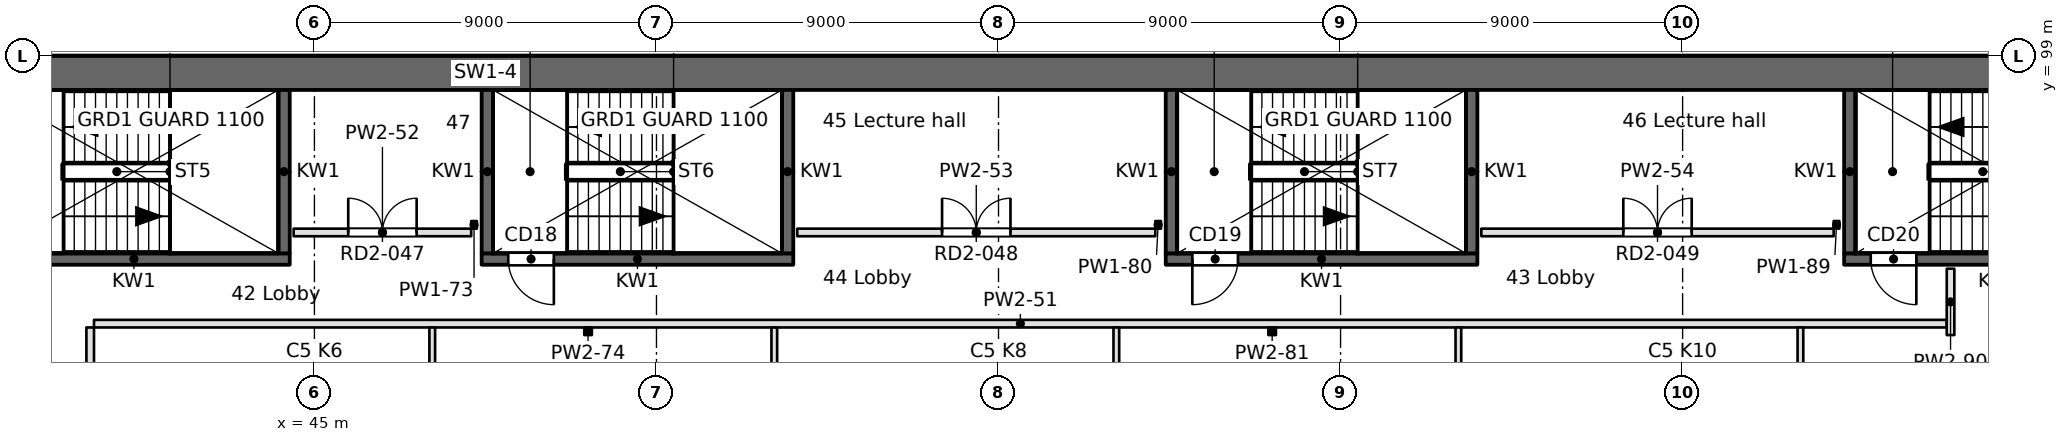
"""IFC4 building model, lengths in metres.
Left out: names, types, materials, properties, quantities, classifications, styles, units other than length and angle.
Written with IfcOpenShell. Run it as: python <this file> out.ifc"""

import sys

from ifc_helpers import new_model, si_unit, direction, frame, frame_2d, origin, place, context, subcontext, project, spatial, rectangle, extrude, element, fill, save


model = new_model("IFC4")
c1 = context("Model", 3, precision=1e-05, world=origin(), true_north=direction((0.0, 1.0)))
c2 = subcontext(c1, "Body", "Model", "MODEL_VIEW")
j1 = project(units=[si_unit("LENGTHUNIT", "METRE"), si_unit("PLANEANGLEUNIT", "RADIAN")], contexts=[c1])
p1 = place(None, origin())
s1 = spatial("IfcSite", under=j1, at=p1, CompositionType="ELEMENT")
p2 = place(p1, origin())
s2 = spatial("IfcBuilding", under=s1, at=p2, CompositionType="ELEMENT")
p3 = place(p2, frame((0.0, 0.0, 46.9)))
s3 = spatial("IfcBuildingStorey", under=s2, at=p3, CompositionType="ELEMENT", Elevation=46.9)
p4 = place(p3, frame((94.5, 98.55, 0.0), z_axis=(0.0, 0.0, 1.0), x_axis=(-1.0, 0.0, 0.0)))
e1 = element("IfcWall", 1, at=p4, inside=s3, PredefinedType="SHEAR", context=c2, shape_type="SweptSolid", body=[
    extrude(rectangle(XDim=90.0, YDim=0.9, at=frame_2d((45.0, 0.0))), origin(), (0.0, 0.0, 1.0), 3.7),
])
p5 = place(p3, frame((36.15, 93.65, -0.4), z_axis=(0.0, 0.0, 1.0), x_axis=(1.0, 0.0, 0.0)))
e2 = element("IfcWall", 2, at=p5, inside=s3, PredefinedType="SOLIDWALL", context=c2, shape_type="SweptSolid", body=[
    extrude(rectangle(XDim=8.2, YDim=0.3, at=frame_2d((4.1, 0.0))), origin(), (0.0, 0.0, 1.0), 3.7),
])
p6 = place(p5, frame((0.7, 0.0, 0.4)))
e3 = element("IfcOpeningElement", 3, at=p6, cuts=e2, PredefinedType="OPENING", context=c2, shape_type="SweptSolid", body=[
    extrude(rectangle(XDim=1.2, YDim=2.1, at=frame_2d((0.6, 1.05))), frame((0.0, 0.15, 0.0), z_axis=(0.0, -1.0, 0.0), x_axis=(1.0, 0.0, 0.0)), (0.0, 0.0, 1.0), 0.3),
])
p7 = place(p3, frame((49.4, 93.65, -0.4), z_axis=(0.0, 0.0, 1.0), x_axis=(1.0, 0.0, 0.0)))
e4 = element("IfcWall", 4, at=p7, inside=s3, PredefinedType="SOLIDWALL", context=c2, shape_type="SweptSolid", body=[
    extrude(rectangle(XDim=8.2, YDim=0.3, at=frame_2d((4.1, 0.0))), origin(), (0.0, 0.0, 1.0), 3.7),
])
p8 = place(p7, frame((0.7, 0.0, 0.4)))
e5 = element("IfcOpeningElement", 5, at=p8, cuts=e4, PredefinedType="OPENING", context=c2, shape_type="SweptSolid", body=[
    extrude(rectangle(XDim=1.2, YDim=2.1, at=frame_2d((0.6, 1.05))), frame((0.0, 0.15, 0.0), z_axis=(0.0, -1.0, 0.0), x_axis=(1.0, 0.0, 0.0)), (0.0, 0.0, 1.0), 0.3),
])
p9 = place(p3, frame((67.4, 93.65, -0.4), z_axis=(0.0, 0.0, 1.0), x_axis=(1.0, 0.0, 0.0)))
e6 = element("IfcWall", 6, at=p9, inside=s3, PredefinedType="SOLIDWALL", context=c2, shape_type="SweptSolid", body=[
    extrude(rectangle(XDim=8.2, YDim=0.3, at=frame_2d((4.1, 0.0))), origin(), (0.0, 0.0, 1.0), 3.7),
])
p10 = place(p9, frame((0.7, 0.0, 0.4)))
e7 = element("IfcOpeningElement", 7, at=p10, cuts=e6, PredefinedType="OPENING", context=c2, shape_type="SweptSolid", body=[
    extrude(rectangle(XDim=1.2, YDim=2.1, at=frame_2d((0.6, 1.05))), frame((0.0, 0.15, 0.0), z_axis=(0.0, -1.0, 0.0), x_axis=(1.0, 0.0, 0.0)), (0.0, 0.0, 1.0), 0.3),
])
p11 = place(p3, frame((85.25, 93.65, -0.4), z_axis=(0.0, 0.0, 1.0), x_axis=(1.0, 0.0, 0.0)))
e8 = element("IfcWall", 8, at=p11, inside=s3, PredefinedType="SOLIDWALL", context=c2, shape_type="SweptSolid", body=[
    extrude(rectangle(XDim=8.2, YDim=0.3, at=frame_2d((4.1, 0.0))), origin(), (0.0, 0.0, 1.0), 3.7),
])
p12 = place(p11, frame((0.7, 0.0, 0.4)))
e9 = element("IfcOpeningElement", 9, at=p12, cuts=e8, PredefinedType="OPENING", context=c2, shape_type="SweptSolid", body=[
    extrude(rectangle(XDim=1.2, YDim=2.1, at=frame_2d((0.6, 1.05))), frame((0.0, 0.15, 0.0), z_axis=(0.0, -1.0, 0.0), x_axis=(1.0, 0.0, 0.0)), (0.0, 0.0, 1.0), 0.3),
])
for number, where, z_axis, x_axis in (
    (10, (44.2, 93.8, -0.4), (0.0, 0.0, 1.0), (0.0, 1.0, 0.0)),
    (11, (49.55, 93.8, -0.4), (0.0, 0.0, 1.0), (0.0, 1.0, 0.0)),
    (12, (57.45, 93.8, -0.4), (0.0, 0.0, 1.0), (0.0, 1.0, 0.0)),
    (13, (67.55, 93.8, -0.4), (0.0, 0.0, 1.0), (0.0, 1.0, 0.0)),
    (14, (75.45, 93.8, -0.4), (0.0, 0.0, 1.0), (0.0, 1.0, 0.0)),
    (15, (85.4, 93.8, -0.4), (0.0, 0.0, 1.0), (0.0, 1.0, 0.0)),
):
    element("IfcWall", number, at=place(p3, frame(where, z_axis=z_axis, x_axis=x_axis)), inside=s3, PredefinedType="SOLIDWALL", context=c2, shape_type="SweptSolid", body=[
        extrude(rectangle(XDim=4.3, YDim=0.3, at=frame_2d((2.15, 0.0))), origin(), (0.0, 0.0, 1.0), 3.7),
    ])
p13 = place(p3, frame((87.95, 91.95, 0.0), z_axis=(0.0, 0.0, 1.0), x_axis=(-1.0, 0.0, 0.0)))
e16 = element("IfcWall", 16, at=p13, inside=s3, PredefinedType="PARTITIONING", context=c2, shape_type="SweptSolid", body=[
    extrude(rectangle(XDim=48.75, YDim=0.2, at=frame_2d((24.375, 0.0))), origin(), (0.0, 0.0, 1.0), 3.3),
])
p14 = place(p3, frame((44.454, 94.35, 0.0), z_axis=(0.0, 0.0, 1.0), x_axis=(1.0, 0.0, 0.0)))
e17 = element("IfcWall", 17, at=p14, inside=s3, PredefinedType="PARTITIONING", context=c2, shape_type="SweptSolid", body=[
    extrude(rectangle(XDim=4.671, YDim=0.2, at=frame_2d((2.335, 0.0))), origin(), (0.0, 0.0, 1.0), 3.3),
])
p15 = place(p14, frame((1.436, 0.0, 0.0)))
e18 = element("IfcOpeningElement", 18, at=p15, cuts=e17, PredefinedType="OPENING", context=c2, shape_type="SweptSolid", body=[
    extrude(rectangle(XDim=1.8, YDim=2.1, at=frame_2d((0.9, 1.05))), frame((0.0, 0.1, 0.0), z_axis=(0.0, -1.0, 0.0), x_axis=(1.0, 0.0, 0.0)), (0.0, 0.0, 1.0), 0.2),
])
p16 = place(p3, frame((57.704, 94.35, 0.0), z_axis=(0.0, 0.0, 1.0), x_axis=(1.0, 0.0, 0.0)))
e19 = element("IfcWall", 19, at=p16, inside=s3, PredefinedType="PARTITIONING", context=c2, shape_type="SweptSolid", body=[
    extrude(rectangle(XDim=9.421, YDim=0.2, at=frame_2d((4.71, 0.0))), origin(), (0.0, 0.0, 1.0), 3.3),
])
p17 = place(p16, frame((3.811, 0.0, 0.0)))
e20 = element("IfcOpeningElement", 20, at=p17, cuts=e19, PredefinedType="OPENING", context=c2, shape_type="SweptSolid", body=[
    extrude(rectangle(XDim=1.8, YDim=2.1, at=frame_2d((0.9, 1.05))), frame((0.0, 0.1, 0.0), z_axis=(0.0, -1.0, 0.0), x_axis=(1.0, 0.0, 0.0)), (0.0, 0.0, 1.0), 0.2),
])
p18 = place(p3, frame((75.704, 94.35, 0.0), z_axis=(0.0, 0.0, 1.0), x_axis=(1.0, 0.0, 0.0)))
e21 = element("IfcWall", 21, at=p18, inside=s3, PredefinedType="PARTITIONING", context=c2, shape_type="SweptSolid", body=[
    extrude(rectangle(XDim=9.271, YDim=0.2, at=frame_2d((4.635, 0.0))), origin(), (0.0, 0.0, 1.0), 3.3),
])
p19 = place(p18, frame((3.736, 0.0, 0.0)))
e22 = element("IfcOpeningElement", 22, at=p19, cuts=e21, PredefinedType="OPENING", context=c2, shape_type="SweptSolid", body=[
    extrude(rectangle(XDim=1.8, YDim=2.1, at=frame_2d((0.9, 1.05))), frame((0.0, 0.1, 0.0), z_axis=(0.0, -1.0, 0.0), x_axis=(1.0, 0.0, 0.0)), (0.0, 0.0, 1.0), 0.2),
])
p20 = place(p3, frame((39.1, 91.85, 0.0), z_axis=(0.0, 0.0, 1.0), x_axis=(0.0, -1.0, 0.0)))
e23 = element("IfcWall", 23, at=p20, inside=s3, PredefinedType="PARTITIONING", context=c2, shape_type="SweptSolid", body=[
    extrude(rectangle(XDim=15.75, YDim=0.2, at=frame_2d((7.875, 0.0))), origin(), (0.0, 0.0, 1.0), 3.3),
])
p21 = place(p20, frame((7.375, 0.0, 0.0)))
e24 = element("IfcOpeningElement", 24, at=p21, cuts=e23, PredefinedType="OPENING", context=c2, shape_type="SweptSolid", body=[
    extrude(rectangle(XDim=1.0, YDim=2.1, at=frame_2d((0.5, 1.05))), frame((0.0, 0.1, 0.0), z_axis=(0.0, -1.0, 0.0), x_axis=(1.0, 0.0, 0.0)), (0.0, 0.0, 1.0), 0.2),
])
p22 = place(p20, frame((4.875, 0.0, 0.0)))
e25 = element("IfcOpeningElement", 25, at=p22, cuts=e23, PredefinedType="OPENING", context=c2, shape_type="SweptSolid", body=[
    extrude(rectangle(XDim=1.0, YDim=2.1, at=frame_2d((0.5, 1.05))), frame((0.0, 0.1, 0.0), z_axis=(0.0, -1.0, 0.0), x_axis=(1.0, 0.0, 0.0)), (0.0, 0.0, 1.0), 0.2),
])
p23 = place(p3, frame((48.1, 91.85, 0.0), z_axis=(0.0, 0.0, 1.0), x_axis=(0.0, -1.0, 0.0)))
e26 = element("IfcWall", 26, at=p23, inside=s3, PredefinedType="PARTITIONING", context=c2, shape_type="SweptSolid", body=[
    extrude(rectangle(XDim=15.75, YDim=0.15, at=frame_2d((7.875, 0.0))), origin(), (0.0, 0.0, 1.0), 3.3),
])
p24 = place(p3, frame((49.2, 94.65, 0.0), z_axis=(0.0, 0.0, 1.0), x_axis=(0.0, -1.0, 0.0)))
e27 = element("IfcWall", 27, at=p24, inside=s3, PredefinedType="PARTITIONING", context=c2, shape_type="SweptSolid", body=[
    extrude(rectangle(XDim=0.2, YDim=0.15, at=frame_2d((0.1, 0.0))), origin(), (0.0, 0.0, 1.0), 3.3),
])
p25 = place(p3, frame((52.2, 91.85, 0.0), z_axis=(0.0, 0.0, 1.0), x_axis=(0.0, -1.0, 0.0)))
e28 = element("IfcWall", 28, at=p25, inside=s3, PredefinedType="PARTITIONING", context=c2, shape_type="SweptSolid", body=[
    extrude(rectangle(XDim=0.2, YDim=0.2, at=frame_2d((0.1, 0.0))), origin(), (0.0, 0.0, 1.0), 3.3),
])
for number, where, z_axis, x_axis in (
    (29, (57.1, 91.85, 0.0), (0.0, 0.0, 1.0), (0.0, -1.0, 0.0)),
    (30, (66.1, 91.85, 0.0), (0.0, 0.0, 1.0), (0.0, -1.0, 0.0)),
):
    element("IfcWall", number, at=place(p3, frame(where, z_axis=z_axis, x_axis=x_axis)), inside=s3, PredefinedType="PARTITIONING", context=c2, shape_type="SweptSolid", body=[
        extrude(rectangle(XDim=15.75, YDim=0.15, at=frame_2d((7.875, 0.0))), origin(), (0.0, 0.0, 1.0), 3.3),
    ])
p26 = place(p3, frame((67.2, 94.65, 0.0), z_axis=(0.0, 0.0, 1.0), x_axis=(0.0, -1.0, 0.0)))
e31 = element("IfcWall", 31, at=p26, inside=s3, PredefinedType="PARTITIONING", context=c2, shape_type="SweptSolid", body=[
    extrude(rectangle(XDim=0.2, YDim=0.15, at=frame_2d((0.1, 0.0))), origin(), (0.0, 0.0, 1.0), 3.3),
])
p27 = place(p3, frame((70.2, 91.85, 0.0), z_axis=(0.0, 0.0, 1.0), x_axis=(0.0, -1.0, 0.0)))
e32 = element("IfcWall", 32, at=p27, inside=s3, PredefinedType="PARTITIONING", context=c2, shape_type="SweptSolid", body=[
    extrude(rectangle(XDim=0.2, YDim=0.2, at=frame_2d((0.1, 0.0))), origin(), (0.0, 0.0, 1.0), 3.3),
])
for number, where, z_axis, x_axis in (
    (33, (75.1, 91.85, 0.0), (0.0, 0.0, 1.0), (0.0, -1.0, 0.0)),
    (34, (84.1, 91.85, 0.0), (0.0, 0.0, 1.0), (0.0, -1.0, 0.0)),
):
    element("IfcWall", number, at=place(p3, frame(where, z_axis=z_axis, x_axis=x_axis)), inside=s3, PredefinedType="PARTITIONING", context=c2, shape_type="SweptSolid", body=[
        extrude(rectangle(XDim=15.75, YDim=0.15, at=frame_2d((7.875, 0.0))), origin(), (0.0, 0.0, 1.0), 3.3),
    ])
p28 = place(p3, frame((85.05, 94.65, 0.0), z_axis=(0.0, 0.0, 1.0), x_axis=(0.0, -1.0, 0.0)))
e35 = element("IfcWall", 35, at=p28, inside=s3, PredefinedType="PARTITIONING", context=c2, shape_type="SweptSolid", body=[
    extrude(rectangle(XDim=0.2, YDim=0.15, at=frame_2d((0.1, 0.0))), origin(), (0.0, 0.0, 1.0), 3.3),
])
p29 = place(p3, frame((88.05, 93.396, 0.0), z_axis=(0.0, 0.0, 1.0), x_axis=(0.0, -1.0, 0.0)))
e36 = element("IfcWall", 36, at=p29, inside=s3, PredefinedType="PARTITIONING", context=c2, shape_type="SweptSolid", body=[
    extrude(rectangle(XDim=1.746, YDim=0.2, at=frame_2d((0.873, 0.0))), origin(), (0.0, 0.0, 1.0), 3.3),
])
p30 = place(p8, frame((1.2, 0.0, 0.0), z_axis=(0.0, 0.0, 1.0), x_axis=(-1.0, 0.0, 0.0)))
e37 = element("IfcDoor", 37, at=p30, inside=s3, OperationType="SINGLE_SWING_LEFT", PredefinedType="DOOR", context=c2, shape_type="SweptSolid", body=[
    extrude(rectangle(XDim=1.2, YDim=2.1, at=frame_2d((0.6, 1.05))), frame((0.0, 0.025, 0.0), z_axis=(0.0, -1.0, 0.0), x_axis=(1.0, 0.0, 0.0)), (0.0, 0.0, 1.0), 0.05),
])
fill(e5, e37)
p31 = place(p10, frame((1.2, 0.0, 0.0), z_axis=(0.0, 0.0, 1.0), x_axis=(-1.0, 0.0, 0.0)))
e38 = element("IfcDoor", 38, at=p31, inside=s3, OperationType="SINGLE_SWING_RIGHT", PredefinedType="DOOR", context=c2, shape_type="SweptSolid", body=[
    extrude(rectangle(XDim=1.2, YDim=2.1, at=frame_2d((0.6, 1.05))), frame((0.0, 0.025, 0.0), z_axis=(0.0, -1.0, 0.0), x_axis=(1.0, 0.0, 0.0)), (0.0, 0.0, 1.0), 0.05),
])
fill(e7, e38)
p32 = place(p12, frame((1.2, 0.0, 0.0), z_axis=(0.0, 0.0, 1.0), x_axis=(-1.0, 0.0, 0.0)))
e39 = element("IfcDoor", 39, at=p32, inside=s3, OperationType="SINGLE_SWING_LEFT", PredefinedType="DOOR", context=c2, shape_type="SweptSolid", body=[
    extrude(rectangle(XDim=1.2, YDim=2.1, at=frame_2d((0.6, 1.05))), frame((0.0, 0.025, 0.0), z_axis=(0.0, -1.0, 0.0), x_axis=(1.0, 0.0, 0.0)), (0.0, 0.0, 1.0), 0.05),
])
fill(e9, e39)
p33 = place(p15, origin())
e40 = element("IfcDoor", 40, at=p33, inside=s3, OperationType="DOUBLE_DOOR_SINGLE_SWING", PredefinedType="DOOR", context=c2, shape_type="SweptSolid", body=[
    extrude(rectangle(XDim=1.8, YDim=2.1, at=frame_2d((0.9, 1.05))), frame((0.0, 0.025, 0.0), z_axis=(0.0, -1.0, 0.0), x_axis=(1.0, 0.0, 0.0)), (0.0, 0.0, 1.0), 0.05),
])
fill(e18, e40)
p34 = place(p17, origin())
e41 = element("IfcDoor", 41, at=p34, inside=s3, OperationType="DOUBLE_DOOR_SINGLE_SWING", PredefinedType="DOOR", context=c2, shape_type="SweptSolid", body=[
    extrude(rectangle(XDim=1.8, YDim=2.1, at=frame_2d((0.9, 1.05))), frame((0.0, 0.025, 0.0), z_axis=(0.0, -1.0, 0.0), x_axis=(1.0, 0.0, 0.0)), (0.0, 0.0, 1.0), 0.05),
])
fill(e20, e41)
p35 = place(p19, origin())
e42 = element("IfcDoor", 42, at=p35, inside=s3, OperationType="DOUBLE_DOOR_SINGLE_SWING", PredefinedType="DOOR", context=c2, shape_type="SweptSolid", body=[
    extrude(rectangle(XDim=1.8, YDim=2.1, at=frame_2d((0.9, 1.05))), frame((0.0, 0.025, 0.0), z_axis=(0.0, -1.0, 0.0), x_axis=(1.0, 0.0, 0.0)), (0.0, 0.0, 1.0), 0.05),
])
fill(e22, e42)
save(model, sys.argv[1])
